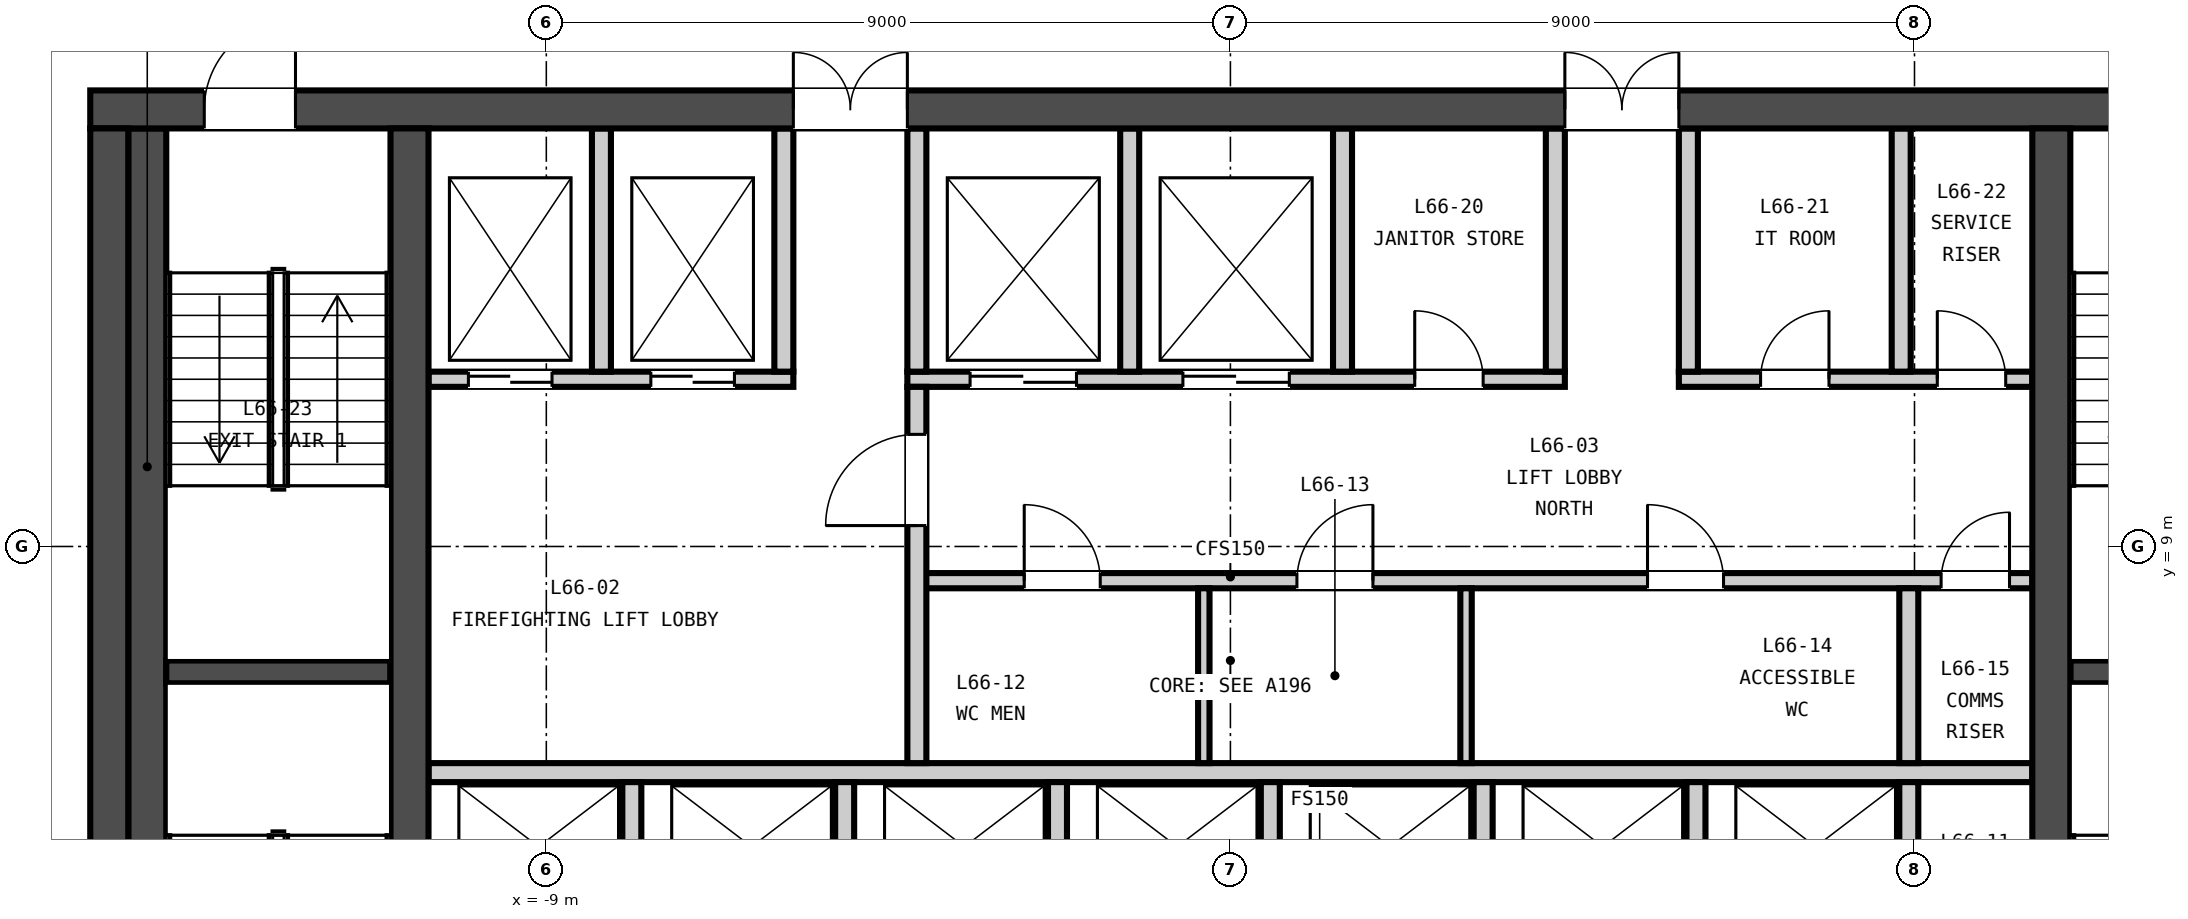
"""IFC4 building model, lengths in metres.
Left out: names, types, materials, properties, quantities, classifications, styles, units other than length and angle.
Written with IfcOpenShell. Run it as: python <this file> out.ifc"""

import sys

from ifc_helpers import new_model, si_unit, direction, frame, frame_2d, origin, place, context, subcontext, project, spatial, rectangle, extrude, element, fill, save


model = new_model("IFC4")
c1 = context("Model", 3, precision=1e-05, world=origin(), true_north=direction((0.0, 1.0)))
c2 = subcontext(c1, "Body", "Model", "MODEL_VIEW")
j1 = project(units=[si_unit("LENGTHUNIT", "METRE"), si_unit("PLANEANGLEUNIT", "RADIAN")], contexts=[c1])
p1 = place(None, origin())
s1 = spatial("IfcSite", under=j1, at=p1, CompositionType="ELEMENT")
p2 = place(p1, origin())
s2 = spatial("IfcBuilding", under=s1, at=p2, CompositionType="ELEMENT")
p3 = place(p2, frame((0.0, 0.0, 260.95)))
s3 = spatial("IfcBuildingStorey", under=s2, at=p3, CompositionType="ELEMENT", Elevation=260.95)
p4 = place(p3, frame((-15.0, 14.75, -0.15), z_axis=(0.0, 0.0, 1.0), x_axis=(1.0, 0.0, 0.0)))
e1 = element("IfcWall", 1, at=p4, inside=s3, PredefinedType="SOLIDWALL", context=c2, shape_type="SweptSolid", body=[
    extrude(rectangle(XDim=30.0, YDim=0.5, at=frame_2d((15.0, 0.0))), origin(), (0.0, 0.0, 1.0), 3.65),
])
p5 = place(p4, frame((9.25, 0.0, 0.15)))
e2 = element("IfcOpeningElement", 2, at=p5, cuts=e1, PredefinedType="OPENING", context=c2, shape_type="SweptSolid", body=[
    extrude(rectangle(XDim=1.5, YDim=2.1, at=frame_2d((0.75, 1.05))), frame((0.0, 0.26, 0.0), z_axis=(0.0, -1.0, 0.0), x_axis=(1.0, 0.0, 0.0)), (0.0, 0.0, 1.0), 0.52),
])
p6 = place(p4, frame((19.4, 0.0, 0.15)))
e3 = element("IfcOpeningElement", 3, at=p6, cuts=e1, PredefinedType="OPENING", context=c2, shape_type="SweptSolid", body=[
    extrude(rectangle(XDim=1.5, YDim=2.1, at=frame_2d((0.75, 1.05))), frame((0.0, 0.26, 0.0), z_axis=(0.0, -1.0, 0.0), x_axis=(1.0, 0.0, 0.0)), (0.0, 0.0, 1.0), 0.52),
])
p7 = place(p4, frame((1.5, 0.0, 0.15)))
e4 = element("IfcOpeningElement", 4, at=p7, cuts=e1, PredefinedType="OPENING", context=c2, shape_type="SweptSolid", body=[
    extrude(rectangle(XDim=1.2, YDim=2.1, at=frame_2d((0.6, 1.05))), frame((0.0, 0.26, 0.0), z_axis=(0.0, -1.0, 0.0), x_axis=(1.0, 0.0, 0.0)), (0.0, 0.0, 1.0), 0.52),
])
p8 = place(p4, frame((27.3, 0.0, 0.15)))
e5 = element("IfcOpeningElement", 5, at=p8, cuts=e1, PredefinedType="OPENING", context=c2, shape_type="SweptSolid", body=[
    extrude(rectangle(XDim=1.2, YDim=2.1, at=frame_2d((0.6, 1.05))), frame((0.0, 0.26, 0.0), z_axis=(0.0, -1.0, 0.0), x_axis=(1.0, 0.0, 0.0)), (0.0, 0.0, 1.0), 0.52),
])
for number, where, z_axis, x_axis in (
    (6, (-14.75, 0.5, -0.15), (0.0, 0.0, 1.0), (0.0, 1.0, 0.0)),
    (7, (-10.8, 0.5, -0.15), (0.0, 0.0, 1.0), (0.0, 1.0, 0.0)),
    (8, (10.8, 0.5, -0.15), (0.0, 0.0, 1.0), (0.0, 1.0, 0.0)),
):
    element("IfcWall", number, at=place(p3, frame(where, z_axis=z_axis, x_axis=x_axis)), inside=s3, PredefinedType="SOLIDWALL", context=c2, shape_type="SweptSolid", body=[
        extrude(rectangle(XDim=14.0, YDim=0.5, at=frame_2d((7.0, 0.0))), origin(), (0.0, 0.0, 1.0), 3.65),
    ])
p9 = place(p3, frame((-10.55, 6.025, 0.0), z_axis=(0.0, 0.0, 1.0), x_axis=(1.0, 0.0, 0.0)))
e9 = element("IfcWall", 9, at=p9, inside=s3, PredefinedType="PARTITIONING", context=c2, shape_type="SweptSolid", body=[
    extrude(rectangle(XDim=21.1, YDim=0.25, at=frame_2d((10.55, 0.0))), origin(), (0.0, 0.0, 1.0), 3.5),
])
p10 = place(p3, frame((-4.125, 8.55, 0.0), z_axis=(0.0, 0.0, 1.0), x_axis=(1.0, 0.0, 0.0)))
e10 = element("IfcWall", 10, at=p10, inside=s3, PredefinedType="PARTITIONING", context=c2, shape_type="SweptSolid", body=[
    extrude(rectangle(XDim=14.675, YDim=0.2, at=frame_2d((7.337, 0.0))), origin(), (0.0, 0.0, 1.0), 3.5),
])
p11 = place(p10, frame((1.413, 0.0, 0.0)))
e11 = element("IfcOpeningElement", 11, at=p11, cuts=e10, PredefinedType="OPENING", context=c2, shape_type="SweptSolid", body=[
    extrude(rectangle(XDim=1.0, YDim=2.1, at=frame_2d((0.5, 1.05))), frame((0.0, 0.11, 0.0), z_axis=(0.0, -1.0, 0.0), x_axis=(1.0, 0.0, 0.0)), (0.0, 0.0, 1.0), 0.22),
])
p12 = place(p10, frame((5.0, 0.0, 0.0)))
e12 = element("IfcOpeningElement", 12, at=p12, cuts=e10, PredefinedType="OPENING", context=c2, shape_type="SweptSolid", body=[
    extrude(rectangle(XDim=1.0, YDim=2.1, at=frame_2d((0.5, 1.05))), frame((0.0, 0.11, 0.0), z_axis=(0.0, -1.0, 0.0), x_axis=(1.0, 0.0, 0.0)), (0.0, 0.0, 1.0), 0.22),
])
p13 = place(p10, frame((9.613, 0.0, 0.0)))
e13 = element("IfcOpeningElement", 13, at=p13, cuts=e10, PredefinedType="OPENING", context=c2, shape_type="SweptSolid", body=[
    extrude(rectangle(XDim=1.0, YDim=2.1, at=frame_2d((0.5, 1.05))), frame((0.0, 0.11, 0.0), z_axis=(0.0, -1.0, 0.0), x_axis=(1.0, 0.0, 0.0)), (0.0, 0.0, 1.0), 0.22),
])
p14 = place(p10, frame((13.475, 0.0, 0.0)))
e14 = element("IfcOpeningElement", 14, at=p14, cuts=e10, PredefinedType="OPENING", context=c2, shape_type="SweptSolid", body=[
    extrude(rectangle(XDim=0.9, YDim=2.1, at=frame_2d((0.45, 1.05))), frame((0.0, 0.11, 0.0), z_axis=(0.0, -1.0, 0.0), x_axis=(1.0, 0.0, 0.0)), (0.0, 0.0, 1.0), 0.22),
])
p15 = place(p3, frame((-10.55, 11.2, 0.0), z_axis=(0.0, 0.0, 1.0), x_axis=(1.0, 0.0, 0.0)))
e15 = element("IfcWall", 15, at=p15, inside=s3, PredefinedType="PARTITIONING", context=c2, shape_type="SweptSolid", body=[
    extrude(rectangle(XDim=4.8, YDim=0.2, at=frame_2d((2.4, 0.0))), origin(), (0.0, 0.0, 1.0), 3.5),
])
p16 = place(p15, frame((0.525, 0.0, 0.0)))
e16 = element("IfcOpeningElement", 16, at=p16, cuts=e15, PredefinedType="OPENING", context=c2, shape_type="SweptSolid", body=[
    extrude(rectangle(XDim=1.1, YDim=2.1, at=frame_2d((0.55, 1.05))), frame((0.0, 0.11, 0.0), z_axis=(0.0, -1.0, 0.0), x_axis=(1.0, 0.0, 0.0)), (0.0, 0.0, 1.0), 0.22),
])
p17 = place(p15, frame((2.925, 0.0, 0.0)))
e17 = element("IfcOpeningElement", 17, at=p17, cuts=e15, PredefinedType="OPENING", context=c2, shape_type="SweptSolid", body=[
    extrude(rectangle(XDim=1.1, YDim=2.1, at=frame_2d((0.55, 1.05))), frame((0.0, 0.11, 0.0), z_axis=(0.0, -1.0, 0.0), x_axis=(1.0, 0.0, 0.0)), (0.0, 0.0, 1.0), 0.22),
])
p18 = place(p3, frame((-4.25, 11.2, 0.0), z_axis=(0.0, 0.0, 1.0), x_axis=(1.0, 0.0, 0.0)))
e18 = element("IfcWall", 18, at=p18, inside=s3, PredefinedType="PARTITIONING", context=c2, shape_type="SweptSolid", body=[
    extrude(rectangle(XDim=8.65, YDim=0.2, at=frame_2d((4.325, 0.0))), origin(), (0.0, 0.0, 1.0), 3.5),
])
p19 = place(p18, frame((0.825, 0.0, 0.0)))
e19 = element("IfcOpeningElement", 19, at=p19, cuts=e18, PredefinedType="OPENING", context=c2, shape_type="SweptSolid", body=[
    extrude(rectangle(XDim=1.4, YDim=2.1, at=frame_2d((0.7, 1.05))), frame((0.0, 0.11, 0.0), z_axis=(0.0, -1.0, 0.0), x_axis=(1.0, 0.0, 0.0)), (0.0, 0.0, 1.0), 0.22),
])
p20 = place(p18, frame((3.625, 0.0, 0.0)))
e20 = element("IfcOpeningElement", 20, at=p20, cuts=e18, PredefinedType="OPENING", context=c2, shape_type="SweptSolid", body=[
    extrude(rectangle(XDim=1.4, YDim=2.1, at=frame_2d((0.7, 1.05))), frame((0.0, 0.11, 0.0), z_axis=(0.0, -1.0, 0.0), x_axis=(1.0, 0.0, 0.0)), (0.0, 0.0, 1.0), 0.22),
])
p21 = place(p18, frame((6.675, 0.0, 0.0)))
e21 = element("IfcOpeningElement", 21, at=p21, cuts=e18, PredefinedType="OPENING", context=c2, shape_type="SweptSolid", body=[
    extrude(rectangle(XDim=0.9, YDim=2.1, at=frame_2d((0.45, 1.05))), frame((0.0, 0.11, 0.0), z_axis=(0.0, -1.0, 0.0), x_axis=(1.0, 0.0, 0.0)), (0.0, 0.0, 1.0), 0.22),
])
p22 = place(p3, frame((5.9, 11.2, 0.0), z_axis=(0.0, 0.0, 1.0), x_axis=(1.0, 0.0, 0.0)))
e22 = element("IfcWall", 22, at=p22, inside=s3, PredefinedType="PARTITIONING", context=c2, shape_type="SweptSolid", body=[
    extrude(rectangle(XDim=4.65, YDim=0.2, at=frame_2d((2.325, 0.0))), origin(), (0.0, 0.0, 1.0), 3.5),
])
p23 = place(p22, frame((1.075, 0.0, 0.0)))
e23 = element("IfcOpeningElement", 23, at=p23, cuts=e22, PredefinedType="OPENING", context=c2, shape_type="SweptSolid", body=[
    extrude(rectangle(XDim=0.9, YDim=2.1, at=frame_2d((0.45, 1.05))), frame((0.0, 0.11, 0.0), z_axis=(0.0, -1.0, 0.0), x_axis=(1.0, 0.0, 0.0)), (0.0, 0.0, 1.0), 0.22),
])
p24 = place(p22, frame((3.4, 0.0, 0.0)))
e24 = element("IfcOpeningElement", 24, at=p24, cuts=e22, PredefinedType="OPENING", context=c2, shape_type="SweptSolid", body=[
    extrude(rectangle(XDim=0.9, YDim=2.1, at=frame_2d((0.45, 1.05))), frame((0.0, 0.11, 0.0), z_axis=(0.0, -1.0, 0.0), x_axis=(1.0, 0.0, 0.0)), (0.0, 0.0, 1.0), 0.22),
])
p25 = place(p3, frame((-4.125, 6.15, 0.0), z_axis=(0.0, 0.0, 1.0), x_axis=(0.0, 1.0, 0.0)))
e25 = element("IfcWall", 25, at=p25, inside=s3, PredefinedType="PARTITIONING", context=c2, shape_type="SweptSolid", body=[
    extrude(rectangle(XDim=4.95, YDim=0.25, at=frame_2d((2.475, 0.0))), origin(), (0.0, 0.0, 1.0), 3.5),
])
p26 = place(p25, frame((3.125, 0.0, 0.0)))
e26 = element("IfcOpeningElement", 26, at=p26, cuts=e25, PredefinedType="OPENING", context=c2, shape_type="SweptSolid", body=[
    extrude(rectangle(XDim=1.2, YDim=2.1, at=frame_2d((0.6, 1.05))), frame((0.0, 0.135, 0.0), z_axis=(0.0, -1.0, 0.0), x_axis=(1.0, 0.0, 0.0)), (0.0, 0.0, 1.0), 0.27),
])
for number, where, z_axis, x_axis in (
    (27, (-7.875, 3.6, 0.0), (0.0, 0.0, 1.0), (0.0, 1.0, 0.0)),
    (28, (-5.075, 3.6, 0.0), (0.0, 0.0, 1.0), (0.0, 1.0, 0.0)),
    (29, (-2.275, 3.6, 0.0), (0.0, 0.0, 1.0), (0.0, 1.0, 0.0)),
    (30, (0.525, 3.6, 0.0), (0.0, 0.0, 1.0), (0.0, 1.0, 0.0)),
    (31, (3.325, 3.6, 0.0), (0.0, 0.0, 1.0), (0.0, 1.0, 0.0)),
    (32, (6.125, 3.6, 0.0), (0.0, 0.0, 1.0), (0.0, 1.0, 0.0)),
    (33, (8.925, 3.6, 0.0), (0.0, 0.0, 1.0), (0.0, 1.0, 0.0)),
):
    element("IfcWall", number, at=place(p3, frame(where, z_axis=z_axis, x_axis=x_axis)), inside=s3, PredefinedType="PARTITIONING", context=c2, shape_type="SweptSolid", body=[
        extrude(rectangle(XDim=2.3, YDim=0.25, at=frame_2d((1.15, 0.0))), origin(), (0.0, 0.0, 1.0), 3.5),
    ])
for number, where, z_axis, x_axis in (
    (34, (-0.35, 6.15, 0.0), (0.0, 0.0, 1.0), (0.0, 1.0, 0.0)),
    (35, (3.1, 6.15, 0.0), (0.0, 0.0, 1.0), (0.0, 1.0, 0.0)),
):
    element("IfcWall", number, at=place(p3, frame(where, z_axis=z_axis, x_axis=x_axis)), inside=s3, PredefinedType="PARTITIONING", context=c2, shape_type="SweptSolid", body=[
        extrude(rectangle(XDim=2.3, YDim=0.15, at=frame_2d((1.15, 0.0))), origin(), (0.0, 0.0, 1.0), 3.5),
    ])
p27 = place(p3, frame((8.925, 6.15, 0.0), z_axis=(0.0, 0.0, 1.0), x_axis=(0.0, 1.0, 0.0)))
e36 = element("IfcWall", 36, at=p27, inside=s3, PredefinedType="PARTITIONING", context=c2, shape_type="SweptSolid", body=[
    extrude(rectangle(XDim=2.3, YDim=0.25, at=frame_2d((1.15, 0.0))), origin(), (0.0, 0.0, 1.0), 3.5),
])
for number, where, z_axis, x_axis in (
    (37, (-8.275, 11.3, 0.0), (0.0, 0.0, 1.0), (0.0, 1.0, 0.0)),
    (38, (-5.875, 11.3, 0.0), (0.0, 0.0, 1.0), (0.0, 1.0, 0.0)),
    (39, (-4.125, 11.3, 0.0), (0.0, 0.0, 1.0), (0.0, 1.0, 0.0)),
    (40, (-1.325, 11.3, 0.0), (0.0, 0.0, 1.0), (0.0, 1.0, 0.0)),
    (41, (1.475, 11.3, 0.0), (0.0, 0.0, 1.0), (0.0, 1.0, 0.0)),
    (42, (4.275, 11.3, 0.0), (0.0, 0.0, 1.0), (0.0, 1.0, 0.0)),
    (43, (6.025, 11.3, 0.0), (0.0, 0.0, 1.0), (0.0, 1.0, 0.0)),
    (44, (8.825, 11.3, 0.0), (0.0, 0.0, 1.0), (0.0, 1.0, 0.0)),
):
    element("IfcWall", number, at=place(p3, frame(where, z_axis=z_axis, x_axis=x_axis)), inside=s3, PredefinedType="PARTITIONING", context=c2, shape_type="SweptSolid", body=[
        extrude(rectangle(XDim=3.2, YDim=0.25, at=frame_2d((1.6, 0.0))), origin(), (0.0, 0.0, 1.0), 3.5),
    ])
p28 = place(p3, frame((-14.0, 7.35, 0.0), z_axis=(0.0, 0.0, 1.0), x_axis=(1.0, 0.0, 0.0)))
e45 = element("IfcWall", 45, at=p28, inside=s3, PredefinedType="SOLIDWALL", context=c2, shape_type="SweptSolid", body=[
    extrude(rectangle(XDim=2.95, YDim=0.3, at=frame_2d((1.475, 0.0))), origin(), (0.0, 0.0, 1.0), 3.5),
])
p29 = place(p3, frame((-14.25, 0.5, 0.0), z_axis=(0.0, 0.0, 1.0), x_axis=(0.0, 1.0, 0.0)))
e46 = element("IfcWall", 46, at=p29, inside=s3, PredefinedType="SOLIDWALL", context=c2, shape_type="SweptSolid", body=[
    extrude(rectangle(XDim=14.0, YDim=0.5, at=frame_2d((7.0, 0.0))), origin(), (0.0, 0.0, 1.0), 3.5),
])
p30 = place(p3, frame((11.05, 7.35, 0.0), z_axis=(0.0, 0.0, 1.0), x_axis=(1.0, 0.0, 0.0)))
e47 = element("IfcWall", 47, at=p30, inside=s3, PredefinedType="SOLIDWALL", context=c2, shape_type="SweptSolid", body=[
    extrude(rectangle(XDim=2.95, YDim=0.3, at=frame_2d((1.475, 0.0))), origin(), (0.0, 0.0, 1.0), 3.5),
])
p31 = place(p3, frame((-17.377, 11.232, 0.0), z_axis=(0.0, 0.0, 1.0), x_axis=(0.309001632963, 0.951061507383, 0.0)))
e48 = element("IfcWall", 48, at=p31, inside=s3, PredefinedType="PARTITIONING", context=c2, shape_type="SweptSolid", body=[
    extrude(rectangle(XDim=6.211, YDim=0.15, at=frame_2d((3.105, 0.0))), origin(), (0.0, 0.0, 1.0), 2.751),
])
p32 = place(p26, origin())
e49 = element("IfcDoor", 49, at=p32, inside=s3, OperationType="SINGLE_SWING_LEFT", PredefinedType="DOOR", context=c2, shape_type="SweptSolid", body=[
    extrude(rectangle(XDim=1.2, YDim=2.1, at=frame_2d((0.6, 1.05))), frame((0.0, 0.025, 0.0), z_axis=(0.0, -1.0, 0.0), x_axis=(1.0, 0.0, 0.0)), (0.0, 0.0, 1.0), 0.05),
])
fill(e26, e49)
p33 = place(p11, origin())
e50 = element("IfcDoor", 50, at=p33, inside=s3, OperationType="SINGLE_SWING_LEFT", PredefinedType="DOOR", context=c2, shape_type="SweptSolid", body=[
    extrude(rectangle(XDim=1.0, YDim=2.1, at=frame_2d((0.5, 1.05))), frame((0.0, 0.025, 0.0), z_axis=(0.0, -1.0, 0.0), x_axis=(1.0, 0.0, 0.0)), (0.0, 0.0, 1.0), 0.05),
])
fill(e11, e50)
p34 = place(p12, origin())
e51 = element("IfcDoor", 51, at=p34, inside=s3, OperationType="SINGLE_SWING_RIGHT", PredefinedType="DOOR", context=c2, shape_type="SweptSolid", body=[
    extrude(rectangle(XDim=1.0, YDim=2.1, at=frame_2d((0.5, 1.05))), frame((0.0, 0.025, 0.0), z_axis=(0.0, -1.0, 0.0), x_axis=(1.0, 0.0, 0.0)), (0.0, 0.0, 1.0), 0.05),
])
fill(e12, e51)
p35 = place(p13, origin())
e52 = element("IfcDoor", 52, at=p35, inside=s3, OperationType="SINGLE_SWING_LEFT", PredefinedType="DOOR", context=c2, shape_type="SweptSolid", body=[
    extrude(rectangle(XDim=1.0, YDim=2.1, at=frame_2d((0.5, 1.05))), frame((0.0, 0.025, 0.0), z_axis=(0.0, -1.0, 0.0), x_axis=(1.0, 0.0, 0.0)), (0.0, 0.0, 1.0), 0.05),
])
fill(e13, e52)
p36 = place(p14, origin())
e53 = element("IfcDoor", 53, at=p36, inside=s3, OperationType="SINGLE_SWING_RIGHT", PredefinedType="DOOR", context=c2, shape_type="SweptSolid", body=[
    extrude(rectangle(XDim=0.9, YDim=2.1, at=frame_2d((0.45, 1.05))), frame((0.0, 0.025, 0.0), z_axis=(0.0, -1.0, 0.0), x_axis=(1.0, 0.0, 0.0)), (0.0, 0.0, 1.0), 0.05),
])
fill(e14, e53)
p37 = place(p16, origin())
e54 = element("IfcDoor", 54, at=p37, inside=s3, OperationType="DOUBLE_DOOR_SLIDING", PredefinedType="DOOR", context=c2, shape_type="SweptSolid", body=[
    extrude(rectangle(XDim=1.1, YDim=2.1, at=frame_2d((0.55, 1.05))), frame((0.0, 0.025, 0.0), z_axis=(0.0, -1.0, 0.0), x_axis=(1.0, 0.0, 0.0)), (0.0, 0.0, 1.0), 0.05),
])
fill(e16, e54)
p38 = place(p17, origin())
e55 = element("IfcDoor", 55, at=p38, inside=s3, OperationType="DOUBLE_DOOR_SLIDING", PredefinedType="DOOR", context=c2, shape_type="SweptSolid", body=[
    extrude(rectangle(XDim=1.1, YDim=2.1, at=frame_2d((0.55, 1.05))), frame((0.0, 0.025, 0.0), z_axis=(0.0, -1.0, 0.0), x_axis=(1.0, 0.0, 0.0)), (0.0, 0.0, 1.0), 0.05),
])
fill(e17, e55)
p39 = place(p19, origin())
e56 = element("IfcDoor", 56, at=p39, inside=s3, OperationType="DOUBLE_DOOR_SLIDING", PredefinedType="DOOR", context=c2, shape_type="SweptSolid", body=[
    extrude(rectangle(XDim=1.4, YDim=2.1, at=frame_2d((0.7, 1.05))), frame((0.0, 0.025, 0.0), z_axis=(0.0, -1.0, 0.0), x_axis=(1.0, 0.0, 0.0)), (0.0, 0.0, 1.0), 0.05),
])
fill(e19, e56)
p40 = place(p20, origin())
e57 = element("IfcDoor", 57, at=p40, inside=s3, OperationType="DOUBLE_DOOR_SLIDING", PredefinedType="DOOR", context=c2, shape_type="SweptSolid", body=[
    extrude(rectangle(XDim=1.4, YDim=2.1, at=frame_2d((0.7, 1.05))), frame((0.0, 0.025, 0.0), z_axis=(0.0, -1.0, 0.0), x_axis=(1.0, 0.0, 0.0)), (0.0, 0.0, 1.0), 0.05),
])
fill(e20, e57)
p41 = place(p21, origin())
e58 = element("IfcDoor", 58, at=p41, inside=s3, OperationType="SINGLE_SWING_LEFT", PredefinedType="DOOR", context=c2, shape_type="SweptSolid", body=[
    extrude(rectangle(XDim=0.9, YDim=2.1, at=frame_2d((0.45, 1.05))), frame((0.0, 0.025, 0.0), z_axis=(0.0, -1.0, 0.0), x_axis=(1.0, 0.0, 0.0)), (0.0, 0.0, 1.0), 0.05),
])
fill(e21, e58)
p42 = place(p23, origin())
e59 = element("IfcDoor", 59, at=p42, inside=s3, OperationType="SINGLE_SWING_RIGHT", PredefinedType="DOOR", context=c2, shape_type="SweptSolid", body=[
    extrude(rectangle(XDim=0.9, YDim=2.1, at=frame_2d((0.45, 1.05))), frame((0.0, 0.025, 0.0), z_axis=(0.0, -1.0, 0.0), x_axis=(1.0, 0.0, 0.0)), (0.0, 0.0, 1.0), 0.05),
])
fill(e23, e59)
p43 = place(p24, origin())
e60 = element("IfcDoor", 60, at=p43, inside=s3, OperationType="SINGLE_SWING_LEFT", PredefinedType="DOOR", context=c2, shape_type="SweptSolid", body=[
    extrude(rectangle(XDim=0.9, YDim=2.1, at=frame_2d((0.45, 1.05))), frame((0.0, 0.025, 0.0), z_axis=(0.0, -1.0, 0.0), x_axis=(1.0, 0.0, 0.0)), (0.0, 0.0, 1.0), 0.05),
])
fill(e24, e60)
p44 = place(p5, origin())
e61 = element("IfcDoor", 61, at=p44, inside=s3, OperationType="DOUBLE_DOOR_SINGLE_SWING", PredefinedType="DOOR", context=c2, shape_type="SweptSolid", body=[
    extrude(rectangle(XDim=1.5, YDim=2.1, at=frame_2d((0.75, 1.05))), frame((0.0, 0.025, 0.0), z_axis=(0.0, -1.0, 0.0), x_axis=(1.0, 0.0, 0.0)), (0.0, 0.0, 1.0), 0.05),
])
fill(e2, e61)
p45 = place(p6, origin())
e62 = element("IfcDoor", 62, at=p45, inside=s3, OperationType="DOUBLE_DOOR_SINGLE_SWING", PredefinedType="DOOR", context=c2, shape_type="SweptSolid", body=[
    extrude(rectangle(XDim=1.5, YDim=2.1, at=frame_2d((0.75, 1.05))), frame((0.0, 0.025, 0.0), z_axis=(0.0, -1.0, 0.0), x_axis=(1.0, 0.0, 0.0)), (0.0, 0.0, 1.0), 0.05),
])
fill(e3, e62)
p46 = place(p7, origin())
e63 = element("IfcDoor", 63, at=p46, inside=s3, OperationType="SINGLE_SWING_RIGHT", PredefinedType="DOOR", context=c2, shape_type="SweptSolid", body=[
    extrude(rectangle(XDim=1.2, YDim=2.1, at=frame_2d((0.6, 1.05))), frame((0.0, 0.025, 0.0), z_axis=(0.0, -1.0, 0.0), x_axis=(1.0, 0.0, 0.0)), (0.0, 0.0, 1.0), 0.05),
])
fill(e4, e63)
save(model, sys.argv[1])
